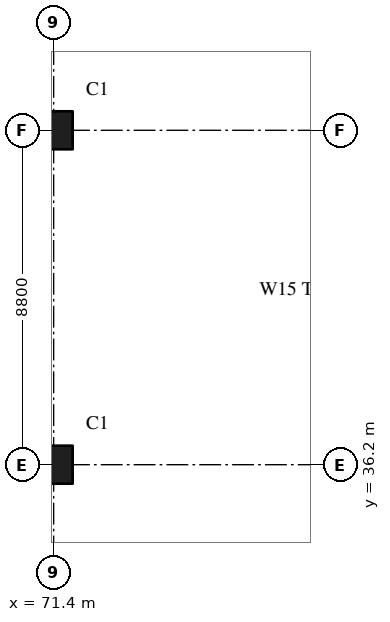
"""IFC4 building model, lengths in metres.
Left out: names, types, materials, properties, quantities, classifications, styles, units other than length and angle.
Written with IfcOpenShell. Run it as: python <this file> out.ifc"""

import sys

from ifc_helpers import new_model, si_unit, direction, frame, origin, origin_2d, place, context, subcontext, project, spatial, rectangle, extrude, element, save


model = new_model("IFC4")
c1 = context("Model", 3, precision=1e-05, world=origin(), true_north=direction((0.0, 1.0)))
c2 = subcontext(c1, "Body", "Model", "MODEL_VIEW")
j1 = project(units=[si_unit("LENGTHUNIT", "METRE"), si_unit("PLANEANGLEUNIT", "RADIAN")], contexts=[c1])
p1 = place(None, origin())
s1 = spatial("IfcSite", under=j1, at=p1, CompositionType="ELEMENT")
p2 = place(p1, origin())
s2 = spatial("IfcBuilding", under=s1, at=p2, CompositionType="ELEMENT")
p3 = place(p2, frame((0.0, 0.0, -12.0)))
s3 = spatial("IfcBuildingStorey", under=s2, at=p3, CompositionType="ELEMENT", Elevation=-12.0)
for number, where, z_axis, x_axis in (
    (1, (71.4, 36.2, 0.0), (0.0, 0.0, 1.0), (1.0, 0.0, 0.0)),
    (2, (71.4, 45.0, 0.0), (0.0, 0.0, 1.0), (1.0, 0.0, 0.0)),
):
    element("IfcColumn", number, at=place(p3, frame(where, z_axis=z_axis, x_axis=x_axis)), inside=s3, PredefinedType="COLUMN", context=c2, shape_type="SweptSolid", body=[
        extrude(rectangle(XDim=1.0, YDim=1.0, at=origin_2d()), origin(), (0.0, 0.0, 1.0), 5.0),
    ])
save(model, sys.argv[1])
